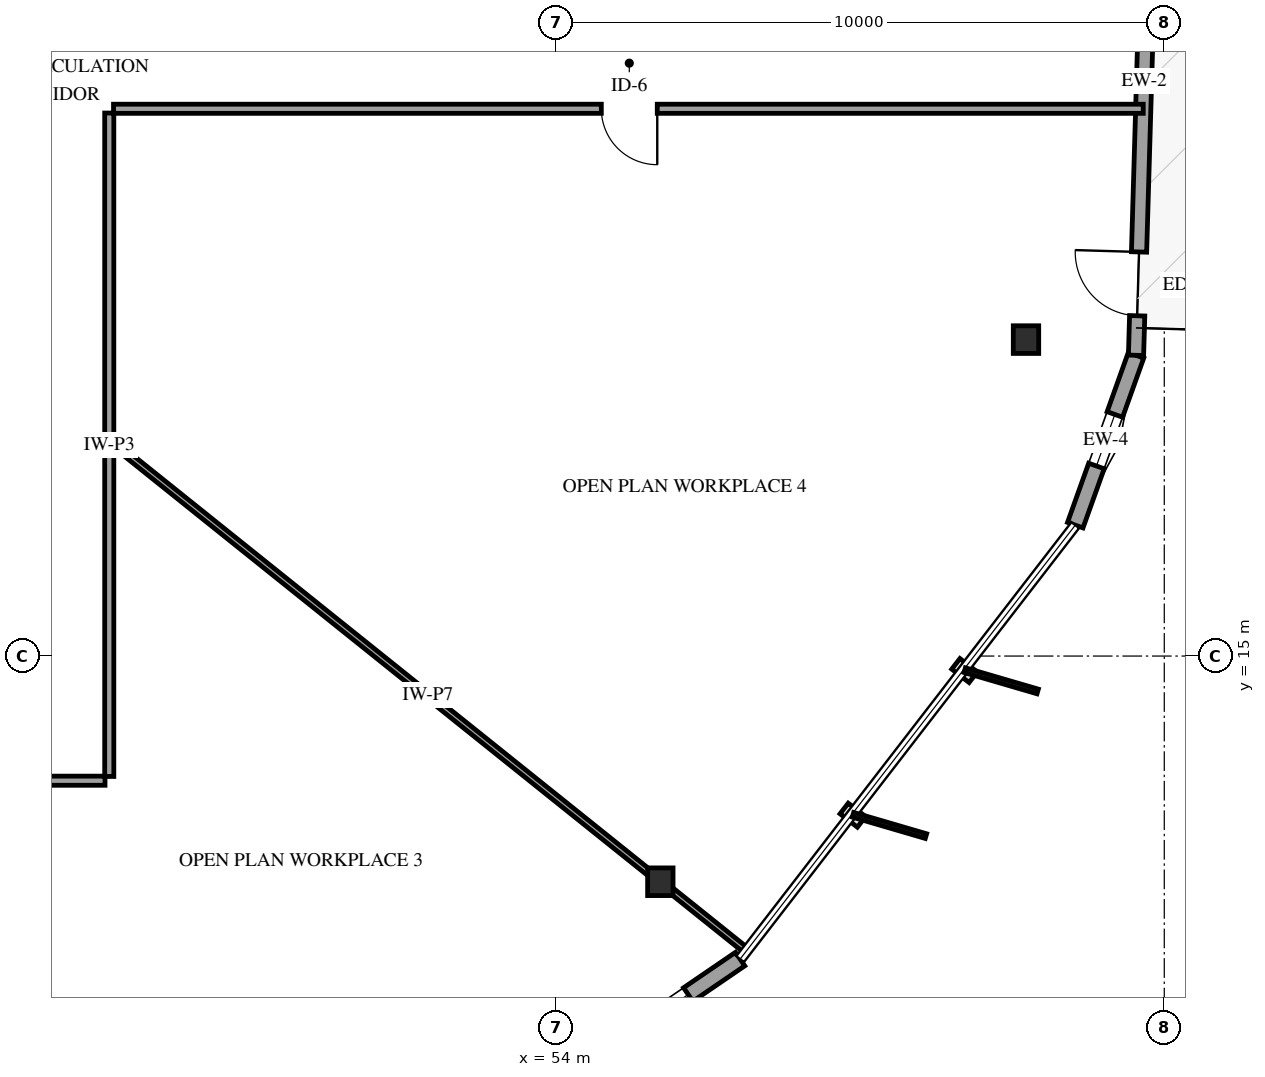
"""IFC4 building model, lengths in metres.
Left out: names, types, materials, properties, quantities, classifications, styles, units other than length and angle.
Written with IfcOpenShell. Run it as: python <this file> out.ifc"""

import sys

from ifc_helpers import new_model, si_unit, direction, frame, frame_2d, origin, origin_2d, place, context, subcontext, project, spatial, rectangle, i_section, extrude, element, fill, save


model = new_model("IFC4")
c1 = context("Model", 3, precision=1e-05, world=origin(), true_north=direction((0.0, 1.0)))
c2 = subcontext(c1, "Body", "Model", "MODEL_VIEW")
j1 = project(units=[si_unit("LENGTHUNIT", "METRE"), si_unit("PLANEANGLEUNIT", "RADIAN")], contexts=[c1])
p1 = place(None, origin())
s1 = spatial("IfcSite", under=j1, at=p1, CompositionType="ELEMENT")
p2 = place(p1, origin())
s2 = spatial("IfcBuilding", under=s1, at=p2, CompositionType="ELEMENT")
p3 = place(p2, frame((0.0, 0.0, 91.3)))
s3 = spatial("IfcBuildingStorey", under=s2, at=p3, CompositionType="ELEMENT", Elevation=91.3)
for number, where, z_axis, x_axis in (
    (1, (55.712, 11.289, 0.0), (0.0, 0.0, 1.0), (1.0, 0.0, 0.0)),
    (2, (61.726, 20.204, 0.0), (0.0, 0.0, 1.0), (1.0, 0.0, 0.0)),
):
    element("IfcColumn", number, at=place(p3, frame(where, z_axis=z_axis, x_axis=x_axis)), inside=s3, PredefinedType="COLUMN", context=c2, shape_type="SweptSolid", body=[
        extrude(i_section(OverallWidth=0.418, OverallDepth=0.455, WebThickness=0.042, FlangeThickness=0.068, FilletRadius=0.038, at=origin_2d()), origin(), (0.0, 0.0, 1.0), 3.9),
    ])
p4 = place(p3, frame((54.575, 8.344, 0.0), z_axis=(0.0, 0.0, 1.0), x_axis=(0.825884174717, 0.563839808768, 0.0)))
e3 = element("IfcWall", 3, at=p4, inside=s3, PredefinedType="SOLIDWALL", context=c2, shape_type="SweptSolid", body=[
    extrude(rectangle(XDim=2.967, YDim=0.27, at=frame_2d((1.483, 0.0))), origin(), (0.0, 0.0, 1.0), 2.979),
])
p5 = place(p4, frame((1.033, 0.0, 0.75)))
e4 = element("IfcOpeningElement", 4, at=p5, cuts=e3, PredefinedType="OPENING", context=c2, shape_type="SweptSolid", body=[
    extrude(rectangle(XDim=0.9, YDim=1.5, at=frame_2d((0.45, 0.75))), frame((0.0, 0.145, 0.0), z_axis=(0.0, -1.0, 0.0), x_axis=(1.0, 0.0, 0.0)), (0.0, 0.0, 1.0), 0.29),
])
p6 = place(p3, frame((62.536, 17.153, 0.0), z_axis=(0.0, 0.0, 1.0), x_axis=(0.336742989922, 0.941596600853, 0.0)))
e5 = element("IfcWall", 5, at=p6, inside=s3, PredefinedType="SOLIDWALL", context=c2, shape_type="SweptSolid", body=[
    extrude(rectangle(XDim=2.967, YDim=0.27, at=frame_2d((1.483, 0.0))), origin(), (0.0, 0.0, 1.0), 2.979),
])
p7 = place(p6, frame((1.033, 0.0, 0.75)))
e6 = element("IfcOpeningElement", 6, at=p7, cuts=e5, PredefinedType="OPENING", context=c2, shape_type="SweptSolid", body=[
    extrude(rectangle(XDim=0.9, YDim=1.5, at=frame_2d((0.45, 0.75))), frame((0.0, 0.145, 0.0), z_axis=(0.0, -1.0, 0.0), x_axis=(1.0, 0.0, 0.0)), (0.0, 0.0, 1.0), 0.29),
])
p8 = place(p3, frame((63.535, 19.946, 0.0), z_axis=(0.0, 0.0, 1.0), x_axis=(0.029323462977, 0.999569974799, 0.0)))
e7 = element("IfcWall", 7, at=p8, inside=s3, PredefinedType="SOLIDWALL", context=c2, shape_type="SweptSolid", body=[
    extrude(rectangle(XDim=9.017, YDim=0.25, at=frame_2d((4.508, 0.0))), origin(), (0.0, 0.0, 1.0), 2.979),
])
p9 = place(p8, frame((0.65, 0.0, 0.0)))
e8 = element("IfcOpeningElement", 8, at=p9, cuts=e7, PredefinedType="OPENING", context=c2, shape_type="SweptSolid", body=[
    extrude(rectangle(XDim=1.05, YDim=2.15, at=frame_2d((0.525, 1.075))), frame((0.0, 0.135, 0.0), z_axis=(0.0, -1.0, 0.0), x_axis=(1.0, 0.0, 0.0)), (0.0, 0.0, 1.0), 0.27),
])
p10 = place(p8, frame((6.682, 0.0, 0.72)))
e9 = element("IfcOpeningElement", 9, at=p10, cuts=e7, PredefinedType="OPENING", context=c2, shape_type="SweptSolid", body=[
    extrude(rectangle(XDim=1.5, YDim=1.7, at=frame_2d((0.75, 0.85))), frame((0.0, 0.135, 0.0), z_axis=(0.0, -1.0, 0.0), x_axis=(1.0, 0.0, 0.0)), (0.0, 0.0, 1.0), 0.27),
])
p11 = place(p3, frame((63.654, 24.0, 0.0), z_axis=(0.0, 0.0, 1.0), x_axis=(-1.0, 0.0, 0.0)))
e10 = element("IfcWall", 10, at=p11, inside=s3, PredefinedType="PARTITIONING", context=c2, shape_type="SweptSolid", body=[
    extrude(rectangle(XDim=16.934, YDim=0.15, at=frame_2d((8.467, 0.0))), origin(), (0.0, 0.0, 1.0), 3.6),
])
p12 = place(p11, frame((7.992, 0.0, 0.0)))
e11 = element("IfcOpeningElement", 11, at=p12, cuts=e10, PredefinedType="OPENING", context=c2, shape_type="SweptSolid", body=[
    extrude(rectangle(XDim=0.92, YDim=2.12, at=frame_2d((0.46, 1.06))), frame((0.0, 0.085, 0.0), z_axis=(0.0, -1.0, 0.0), x_axis=(1.0, 0.0, 0.0)), (0.0, 0.0, 1.0), 0.17),
])
p13 = place(p3, frame((46.65, 18.55, 0.0), z_axis=(0.0, 0.0, 1.0), x_axis=(0.780396792297, -0.625284612455, 0.0)))
e12 = element("IfcWall", 12, at=p13, inside=s3, PredefinedType="PARTITIONING", context=c2, shape_type="SweptSolid", body=[
    extrude(rectangle(XDim=13.429, YDim=0.1, at=frame_2d((6.714, 0.0))), origin(), (0.0, 0.0, 1.0), 3.6),
])
p14 = place(p3, frame((46.58, 12.95, 0.0), z_axis=(0.0, 0.0, 1.0), x_axis=(-1.0, 0.0, 0.0)))
e13 = element("IfcWall", 13, at=p14, inside=s3, PredefinedType="PARTITIONING", context=c2, shape_type="SweptSolid", body=[
    extrude(rectangle(XDim=10.761, YDim=0.15, at=frame_2d((5.38, 0.0))), origin(), (0.0, 0.0, 1.0), 3.6),
])
p15 = place(p14, frame((4.905, 0.0, 0.0)))
e14 = element("IfcOpeningElement", 14, at=p15, cuts=e13, PredefinedType="OPENING", context=c2, shape_type="SweptSolid", body=[
    extrude(rectangle(XDim=0.92, YDim=2.12, at=frame_2d((0.46, 1.06))), frame((0.0, 0.085, 0.0), z_axis=(0.0, -1.0, 0.0), x_axis=(1.0, 0.0, 0.0)), (0.0, 0.0, 1.0), 0.17),
])
p16 = place(p3, frame((46.65, 18.55, 0.0), z_axis=(0.0, 0.0, 1.0), x_axis=(0.0, -1.0, 0.0)))
e15 = element("IfcWall", 15, at=p16, inside=s3, PredefinedType="PARTITIONING", context=c2, shape_type="SweptSolid", body=[
    extrude(rectangle(XDim=5.53, YDim=0.15, at=frame_2d((2.765, 0.0))), origin(), (0.0, 0.0, 1.0), 3.6),
])
p17 = place(p3, frame((46.65, 23.93, 0.0), z_axis=(0.0, 0.0, 1.0), x_axis=(0.0, -1.0, 0.0)))
e16 = element("IfcWall", 16, at=p17, inside=s3, PredefinedType="PARTITIONING", context=c2, shape_type="SweptSolid", body=[
    extrude(rectangle(XDim=5.38, YDim=0.15, at=frame_2d((2.69, 0.0))), origin(), (0.0, 0.0, 1.0), 3.6),
])
p18 = place(p5, origin())
e17 = element("IfcWindow", 17, at=p18, inside=s3, PartitioningType="SINGLE_PANEL", PredefinedType="WINDOW", context=c2, shape_type="SweptSolid", body=[
    extrude(rectangle(XDim=0.9, YDim=1.5, at=frame_2d((0.45, 0.75))), frame((0.0, 0.03, 0.0), z_axis=(0.0, -1.0, 0.0), x_axis=(1.0, 0.0, 0.0)), (0.0, 0.0, 1.0), 0.06),
])
fill(e4, e17)
p19 = place(p7, origin())
e18 = element("IfcWindow", 18, at=p19, inside=s3, PartitioningType="SINGLE_PANEL", PredefinedType="WINDOW", context=c2, shape_type="SweptSolid", body=[
    extrude(rectangle(XDim=0.9, YDim=1.5, at=frame_2d((0.45, 0.75))), frame((0.0, 0.03, 0.0), z_axis=(0.0, -1.0, 0.0), x_axis=(1.0, 0.0, 0.0)), (0.0, 0.0, 1.0), 0.06),
])
fill(e6, e18)
p20 = place(p9, origin())
e19 = element("IfcDoor", 19, at=p20, inside=s3, OperationType="SINGLE_SWING_RIGHT", PredefinedType="DOOR", context=c2, shape_type="SweptSolid", body=[
    extrude(rectangle(XDim=1.05, YDim=2.15, at=frame_2d((0.525, 1.075))), frame((0.0, 0.025, 0.0), z_axis=(0.0, -1.0, 0.0), x_axis=(1.0, 0.0, 0.0)), (0.0, 0.0, 1.0), 0.05),
])
fill(e8, e19)
p21 = place(p12, origin())
e20 = element("IfcDoor", 20, at=p21, inside=s3, OperationType="SINGLE_SWING_LEFT", PredefinedType="DOOR", context=c2, shape_type="SweptSolid", body=[
    extrude(rectangle(XDim=0.92, YDim=2.12, at=frame_2d((0.46, 1.06))), frame((0.0, 0.025, 0.0), z_axis=(0.0, -1.0, 0.0), x_axis=(1.0, 0.0, 0.0)), (0.0, 0.0, 1.0), 0.05),
])
fill(e11, e20)
save(model, sys.argv[1])
